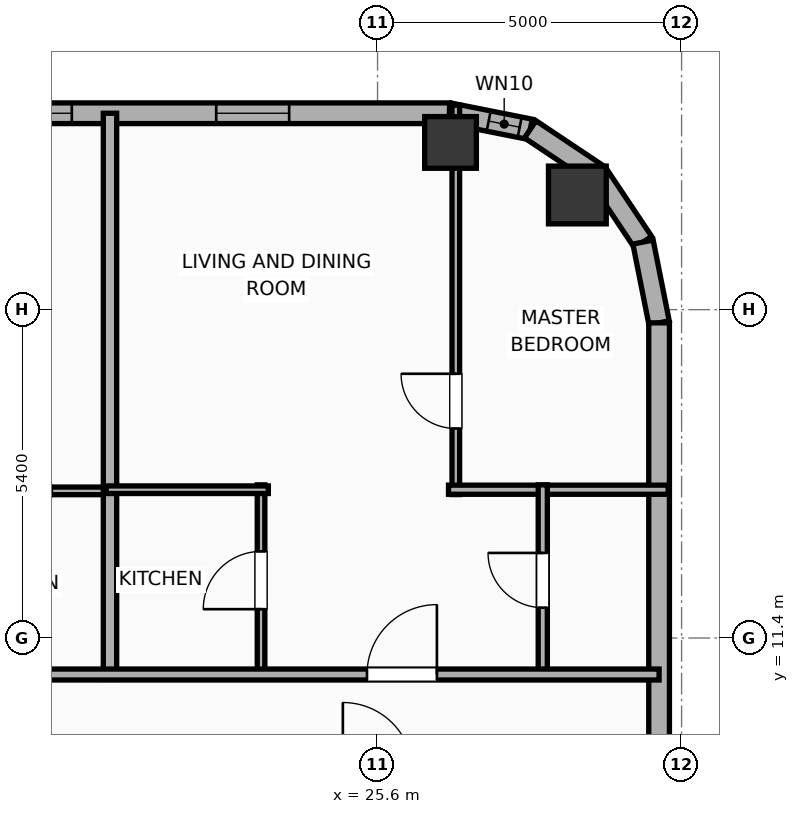
"""IFC4 building model, lengths in metres.
Left out: names, types, materials, properties, quantities, classifications, styles, units other than length and angle.
Written with IfcOpenShell. Run it as: python <this file> out.ifc"""

import sys

from ifc_helpers import new_model, si_unit, direction, frame, frame_2d, origin, origin_2d, place, context, subcontext, project, spatial, rectangle, hollow_rectangle, hollow_circle, extrude, element, fill, save


model = new_model("IFC4")
c1 = context("Model", 3, precision=1e-05, world=origin(), true_north=direction((0.0, 1.0)))
c2 = subcontext(c1, "Body", "Model", "MODEL_VIEW")
j1 = project(units=[si_unit("LENGTHUNIT", "METRE"), si_unit("PLANEANGLEUNIT", "RADIAN")], contexts=[c1])
p1 = place(None, origin())
s1 = spatial("IfcSite", under=j1, at=p1, CompositionType="ELEMENT")
p2 = place(p1, origin())
s2 = spatial("IfcBuilding", under=s1, at=p2, CompositionType="ELEMENT")
p3 = place(p2, frame((0.0, 0.0, 223.6)))
s3 = spatial("IfcBuildingStorey", under=s2, at=p3, CompositionType="ELEMENT", Elevation=223.6)
p4 = place(p3, frame((28.886, 18.686, 0.0), z_axis=(0.0, 0.0, 1.0), x_axis=(1.0, 0.0, 0.0)))
e1 = element("IfcColumn", 1, at=p4, inside=s3, PredefinedType="COLUMN", context=c2, shape_type="SweptSolid", body=[
    extrude(hollow_circle(Radius=0.475, WallThickness=0.032, at=origin_2d()), origin(), (0.0, 0.0, 1.0), 3.9),
])
p5 = place(p3, frame((26.8, 19.55, 0.0), z_axis=(0.0, 0.0, 1.0), x_axis=(1.0, 0.0, 0.0)))
e2 = element("IfcColumn", 2, at=p5, inside=s3, PredefinedType="COLUMN", context=c2, shape_type="SweptSolid", body=[
    extrude(hollow_rectangle(XDim=0.85, YDim=0.85, WallThickness=0.028, at=origin_2d()), origin(), (0.0, 0.0, 1.0), 3.9),
])
p6 = place(p3, frame((-22.783, 20.03, 0.0), z_axis=(0.0, 0.0, 1.0), x_axis=(1.0, 0.0, 0.0)))
e3 = element("IfcWall", 3, at=p6, inside=s3, PredefinedType="ELEMENTEDWALL", context=c2, shape_type="SweptSolid", body=[
    extrude(rectangle(XDim=49.566, YDim=0.34, at=frame_2d((24.783, 0.0))), origin(), (0.0, 0.0, 1.0), 3.65),
])
p7 = place(p6, frame((40.956, 0.0, 0.75)))
e4 = element("IfcOpeningElement", 4, at=p7, cuts=e3, PredefinedType="OPENING", context=c2, shape_type="SweptSolid", body=[
    extrude(rectangle(XDim=2.4, YDim=2.1, at=frame_2d((1.2, 1.05))), frame((0.0, 0.18, 0.0), z_axis=(0.0, -1.0, 0.0), x_axis=(1.0, 0.0, 0.0)), (0.0, 0.0, 1.0), 0.36),
])
p8 = place(p6, frame((1.437, 0.0, 0.75)))
e5 = element("IfcOpeningElement", 5, at=p8, cuts=e3, PredefinedType="OPENING", context=c2, shape_type="SweptSolid", body=[
    extrude(rectangle(XDim=1.2, YDim=2.05, at=frame_2d((0.6, 1.025))), frame((0.0, 0.18, 0.0), z_axis=(0.0, -1.0, 0.0), x_axis=(1.0, 0.0, 0.0)), (0.0, 0.0, 1.0), 0.36),
])
p9 = place(p6, frame((7.619, 0.0, 0.75)))
e6 = element("IfcOpeningElement", 6, at=p9, cuts=e3, PredefinedType="OPENING", context=c2, shape_type="SweptSolid", body=[
    extrude(rectangle(XDim=1.2, YDim=2.05, at=frame_2d((0.6, 1.025))), frame((0.0, 0.18, 0.0), z_axis=(0.0, -1.0, 0.0), x_axis=(1.0, 0.0, 0.0)), (0.0, 0.0, 1.0), 0.36),
])
p10 = place(p6, frame((4.124, 0.0, 0.75)))
e7 = element("IfcOpeningElement", 7, at=p10, cuts=e3, PredefinedType="OPENING", context=c2, shape_type="SweptSolid", body=[
    extrude(rectangle(XDim=1.2, YDim=2.05, at=frame_2d((0.6, 1.025))), frame((0.0, 0.18, 0.0), z_axis=(0.0, -1.0, 0.0), x_axis=(1.0, 0.0, 0.0)), (0.0, 0.0, 1.0), 0.36),
])
p11 = place(p6, frame((11.278, 0.0, 0.75)))
e8 = element("IfcOpeningElement", 8, at=p11, cuts=e3, PredefinedType="OPENING", context=c2, shape_type="SweptSolid", body=[
    extrude(rectangle(XDim=1.2, YDim=2.05, at=frame_2d((0.6, 1.025))), frame((0.0, 0.18, 0.0), z_axis=(0.0, -1.0, 0.0), x_axis=(1.0, 0.0, 0.0)), (0.0, 0.0, 1.0), 0.36),
])
p12 = place(p6, frame((17.953, 0.0, 0.75)))
e9 = element("IfcOpeningElement", 9, at=p12, cuts=e3, PredefinedType="OPENING", context=c2, shape_type="SweptSolid", body=[
    extrude(rectangle(XDim=1.2, YDim=2.05, at=frame_2d((0.6, 1.025))), frame((0.0, 0.18, 0.0), z_axis=(0.0, -1.0, 0.0), x_axis=(1.0, 0.0, 0.0)), (0.0, 0.0, 1.0), 0.36),
])
p13 = place(p6, frame((14.738, 0.0, 0.75)))
e10 = element("IfcOpeningElement", 10, at=p13, cuts=e3, PredefinedType="OPENING", context=c2, shape_type="SweptSolid", body=[
    extrude(rectangle(XDim=1.2, YDim=2.05, at=frame_2d((0.6, 1.025))), frame((0.0, 0.18, 0.0), z_axis=(0.0, -1.0, 0.0), x_axis=(1.0, 0.0, 0.0)), (0.0, 0.0, 1.0), 0.36),
])
p14 = place(p6, frame((21.878, 0.0, 0.75)))
e11 = element("IfcOpeningElement", 11, at=p14, cuts=e3, PredefinedType="OPENING", context=c2, shape_type="SweptSolid", body=[
    extrude(rectangle(XDim=1.2, YDim=2.05, at=frame_2d((0.6, 1.025))), frame((0.0, 0.18, 0.0), z_axis=(0.0, -1.0, 0.0), x_axis=(1.0, 0.0, 0.0)), (0.0, 0.0, 1.0), 0.36),
])
p15 = place(p6, frame((27.878, 0.0, 0.75)))
e12 = element("IfcOpeningElement", 12, at=p15, cuts=e3, PredefinedType="OPENING", context=c2, shape_type="SweptSolid", body=[
    extrude(rectangle(XDim=1.2, YDim=2.05, at=frame_2d((0.6, 1.025))), frame((0.0, 0.18, 0.0), z_axis=(0.0, -1.0, 0.0), x_axis=(1.0, 0.0, 0.0)), (0.0, 0.0, 1.0), 0.36),
])
p16 = place(p6, frame((24.863, 0.0, 0.75)))
e13 = element("IfcOpeningElement", 13, at=p16, cuts=e3, PredefinedType="OPENING", context=c2, shape_type="SweptSolid", body=[
    extrude(rectangle(XDim=1.2, YDim=2.05, at=frame_2d((0.6, 1.025))), frame((0.0, 0.18, 0.0), z_axis=(0.0, -1.0, 0.0), x_axis=(1.0, 0.0, 0.0)), (0.0, 0.0, 1.0), 0.36),
])
p17 = place(p6, frame((32.078, 0.0, 0.75)))
e14 = element("IfcOpeningElement", 14, at=p17, cuts=e3, PredefinedType="OPENING", context=c2, shape_type="SweptSolid", body=[
    extrude(rectangle(XDim=1.2, YDim=2.05, at=frame_2d((0.6, 1.025))), frame((0.0, 0.18, 0.0), z_axis=(0.0, -1.0, 0.0), x_axis=(1.0, 0.0, 0.0)), (0.0, 0.0, 1.0), 0.36),
])
p18 = place(p6, frame((35.216, 0.0, 0.75)))
e15 = element("IfcOpeningElement", 15, at=p18, cuts=e3, PredefinedType="OPENING", context=c2, shape_type="SweptSolid", body=[
    extrude(rectangle(XDim=1.2, YDim=2.05, at=frame_2d((0.6, 1.025))), frame((0.0, 0.18, 0.0), z_axis=(0.0, -1.0, 0.0), x_axis=(1.0, 0.0, 0.0)), (0.0, 0.0, 1.0), 0.36),
])
p19 = place(p6, frame((45.73, 0.0, 0.75)))
e16 = element("IfcOpeningElement", 16, at=p19, cuts=e3, PredefinedType="OPENING", context=c2, shape_type="SweptSolid", body=[
    extrude(rectangle(XDim=1.2, YDim=2.05, at=frame_2d((0.6, 1.025))), frame((0.0, 0.18, 0.0), z_axis=(0.0, -1.0, 0.0), x_axis=(1.0, 0.0, 0.0)), (0.0, 0.0, 1.0), 0.36),
])
p20 = place(p3, frame((26.783, 20.03, 0.0), z_axis=(0.0, 0.0, 1.0), x_axis=(0.980788153188, -0.195075878998, 0.0)))
e17 = element("IfcWall", 17, at=p20, inside=s3, PredefinedType="ELEMENTEDWALL", context=c2, shape_type="SweptSolid", body=[
    extrude(rectangle(XDim=1.354, YDim=0.34, at=frame_2d((0.677, 0.0))), origin(), (0.0, 0.0, 1.0), 3.65),
])
p21 = place(p20, frame((0.657, 0.0, 0.75)))
e18 = element("IfcOpeningElement", 18, at=p21, cuts=e17, PredefinedType="OPENING", context=c2, shape_type="SweptSolid", body=[
    extrude(rectangle(XDim=0.52, YDim=2.05, at=frame_2d((0.26, 1.025))), frame((0.0, 0.18, 0.0), z_axis=(0.0, -1.0, 0.0), x_axis=(1.0, 0.0, 0.0)), (0.0, 0.0, 1.0), 0.36),
])
for number, where, z_axis, x_axis in (
    (19, (28.111, 19.766, 0.0), (0.0, 0.0, 1.0), (0.831, -0.556, 0.0)),
    (20, (29.223, 19.023, 0.0), (0.0, 0.0, 1.0), (0.556, -0.831, 0.0)),
):
    element("IfcWall", number, at=place(p3, frame(where, z_axis=z_axis, x_axis=x_axis)), inside=s3, PredefinedType="ELEMENTEDWALL", context=c2, shape_type="SweptSolid", body=[
        extrude(rectangle(XDim=1.337, YDim=0.34, at=frame_2d((0.668, 0.0))), origin(), (0.0, 0.0, 1.0), 3.65),
    ])
p22 = place(p3, frame((29.966, 17.911, 0.0), z_axis=(0.0, 0.0, 1.0), x_axis=(0.195075878998, -0.980788153188, 0.0)))
e21 = element("IfcWall", 21, at=p22, inside=s3, PredefinedType="ELEMENTEDWALL", context=c2, shape_type="SweptSolid", body=[
    extrude(rectangle(XDim=1.354, YDim=0.34, at=frame_2d((0.677, 0.0))), origin(), (0.0, 0.0, 1.0), 3.65),
])
p23 = place(p3, frame((30.23, 16.583, 0.0), z_axis=(0.0, 0.0, 1.0), x_axis=(0.0, -1.0, 0.0)))
e22 = element("IfcWall", 22, at=p23, inside=s3, PredefinedType="ELEMENTEDWALL", context=c2, shape_type="SweptSolid", body=[
    extrude(rectangle(XDim=31.967, YDim=0.34, at=frame_2d((15.983, 0.0))), origin(), (0.0, 0.0, 1.0), 3.65),
])
p24 = place(p23, frame((30.132, 0.0, 0.75)))
e23 = element("IfcOpeningElement", 23, at=p24, cuts=e22, PredefinedType="OPENING", context=c2, shape_type="SweptSolid", body=[
    extrude(rectangle(XDim=1.2, YDim=2.05, at=frame_2d((0.6, 1.025))), frame((0.0, 0.18, 0.0), z_axis=(0.0, -1.0, 0.0), x_axis=(1.0, 0.0, 0.0)), (0.0, 0.0, 1.0), 0.36),
])
p25 = place(p23, frame((11.288, 0.0, 0.75)))
e24 = element("IfcOpeningElement", 24, at=p25, cuts=e22, PredefinedType="OPENING", context=c2, shape_type="SweptSolid", body=[
    extrude(rectangle(XDim=1.2, YDim=2.05, at=frame_2d((0.6, 1.025))), frame((0.0, 0.18, 0.0), z_axis=(0.0, -1.0, 0.0), x_axis=(1.0, 0.0, 0.0)), (0.0, 0.0, 1.0), 0.36),
])
p26 = place(p23, frame((20.538, 0.0, 0.75)))
e25 = element("IfcOpeningElement", 25, at=p26, cuts=e22, PredefinedType="OPENING", context=c2, shape_type="SweptSolid", body=[
    extrude(rectangle(XDim=1.2, YDim=2.05, at=frame_2d((0.6, 1.025))), frame((0.0, 0.18, 0.0), z_axis=(0.0, -1.0, 0.0), x_axis=(1.0, 0.0, 0.0)), (0.0, 0.0, 1.0), 0.36),
])
p27 = place(p3, frame((18.077, 13.82, 0.0), z_axis=(0.0, 0.0, 1.0), x_axis=(1.0, 0.0, 0.0)))
e26 = element("IfcWall", 26, at=p27, inside=s3, PredefinedType="PARTITIONING", context=c2, shape_type="SweptSolid", body=[
    extrude(rectangle(XDim=3.186, YDim=0.125, at=frame_2d((1.593, 0.0))), origin(), (0.0, 0.0, 1.0), 3.65),
])
p28 = place(p27, frame((1.217, 0.0, 0.0)))
e27 = element("IfcOpeningElement", 27, at=p28, cuts=e26, PredefinedType="OPENING", context=c2, shape_type="SweptSolid", body=[
    extrude(rectangle(XDim=0.95, YDim=2.05, at=frame_2d((0.475, 1.025))), frame((0.0, 0.073, 0.0), z_axis=(0.0, -1.0, 0.0), x_axis=(1.0, 0.0, 0.0)), (0.0, 0.0, 1.0), 0.145),
])
p29 = place(p3, frame((21.2, 10.72, 0.0), z_axis=(0.0, 0.0, 1.0), x_axis=(0.0, 1.0, 0.0)))
e28 = element("IfcWall", 28, at=p29, inside=s3, PredefinedType="PARTITIONING", context=c2, shape_type="SweptSolid", body=[
    extrude(rectangle(XDim=9.31, YDim=0.22, at=frame_2d((4.655, 0.0))), origin(), (0.0, 0.0, 1.0), 3.65),
])
p30 = place(p3, frame((26.887, 13.759, 0.0), z_axis=(0.0, 0.0, 1.0), x_axis=(0.0, 1.0, 0.0)))
e29 = element("IfcWall", 29, at=p30, inside=s3, PredefinedType="PARTITIONING", context=c2, shape_type="SweptSolid", body=[
    extrude(rectangle(XDim=6.403, YDim=0.125, at=frame_2d((3.202, 0.0))), origin(), (0.0, 0.0, 1.0), 3.65),
])
p31 = place(p30, frame((1.087, 0.0, 0.0)))
e30 = element("IfcOpeningElement", 30, at=p31, cuts=e29, PredefinedType="OPENING", context=c2, shape_type="SweptSolid", body=[
    extrude(rectangle(XDim=0.9, YDim=2.05, at=frame_2d((0.45, 1.025))), frame((0.0, 0.073, 0.0), z_axis=(0.0, -1.0, 0.0), x_axis=(1.0, 0.0, 0.0)), (0.0, 0.0, 1.0), 0.145),
])
p32 = place(p3, frame((26.767, 13.839, 0.0), z_axis=(0.0, 0.0, 1.0), x_axis=(1.0, 0.0, 0.0)))
e31 = element("IfcWall", 31, at=p32, inside=s3, PredefinedType="PLUMBINGWALL", context=c2, shape_type="SweptSolid", body=[
    extrude(rectangle(XDim=3.613, YDim=0.15, at=frame_2d((1.806, 0.0))), origin(), (0.0, 0.0, 1.0), 3.65),
])
p33 = place(p3, frame((23.684, 10.78, 0.0), z_axis=(0.0, 0.0, 1.0), x_axis=(0.0, 1.0, 0.0)))
e32 = element("IfcWall", 32, at=p33, inside=s3, PredefinedType="PARTITIONING", context=c2, shape_type="SweptSolid", body=[
    extrude(rectangle(XDim=3.139, YDim=0.125, at=frame_2d((1.569, 0.0))), origin(), (0.0, 0.0, 1.0), 3.65),
])
p34 = place(p33, frame((1.094, 0.0, 0.0)))
e33 = element("IfcOpeningElement", 33, at=p34, cuts=e32, PredefinedType="OPENING", context=c2, shape_type="SweptSolid", body=[
    extrude(rectangle(XDim=0.95, YDim=2.05, at=frame_2d((0.475, 1.025))), frame((0.0, 0.073, 0.0), z_axis=(0.0, -1.0, 0.0), x_axis=(1.0, 0.0, 0.0)), (0.0, 0.0, 1.0), 0.145),
])
p35 = place(p3, frame((21.137, 13.839, 0.0), z_axis=(0.0, 0.0, 1.0), x_axis=(1.0, 0.0, 0.0)))
e34 = element("IfcWall", 34, at=p35, inside=s3, PredefinedType="PARTITIONING", context=c2, shape_type="SweptSolid", body=[
    extrude(rectangle(XDim=2.667, YDim=0.125, at=frame_2d((1.333, 0.0))), origin(), (0.0, 0.0, 1.0), 3.65),
])
p36 = place(p3, frame((28.317, 10.78, 0.0), z_axis=(0.0, 0.0, 1.0), x_axis=(0.0, 1.0, 0.0)))
e35 = element("IfcWall", 35, at=p36, inside=s3, PredefinedType="PLUMBINGWALL", context=c2, shape_type="SweptSolid", body=[
    extrude(rectangle(XDim=3.139, YDim=0.15, at=frame_2d((1.569, 0.0))), origin(), (0.0, 0.0, 1.0), 3.65),
])
p37 = place(p36, frame((1.119, 0.0, 0.0)))
e36 = element("IfcOpeningElement", 36, at=p37, cuts=e35, PredefinedType="OPENING", context=c2, shape_type="SweptSolid", body=[
    extrude(rectangle(XDim=0.9, YDim=2.05, at=frame_2d((0.45, 1.025))), frame((0.0, 0.085, 0.0), z_axis=(0.0, -1.0, 0.0), x_axis=(1.0, 0.0, 0.0)), (0.0, 0.0, 1.0), 0.17),
])
p38 = place(p3, frame((-26.23, 10.8, 0.0), z_axis=(0.0, 0.0, 1.0), x_axis=(1.0, 0.0, 0.0)))
e37 = element("IfcWall", 37, at=p38, inside=s3, PredefinedType="PARTITIONING", context=c2, shape_type="SweptSolid", body=[
    extrude(rectangle(XDim=56.46, YDim=0.18, at=frame_2d((28.23, 0.0))), origin(), (0.0, 0.0, 1.0), 3.65),
])
p39 = place(p38, frame((2.994, 0.0, 0.0)))
e38 = element("IfcOpeningElement", 38, at=p39, cuts=e37, PredefinedType="OPENING", context=c2, shape_type="SweptSolid", body=[
    extrude(rectangle(XDim=0.9, YDim=2.05, at=frame_2d((0.45, 1.025))), frame((0.0, 0.1, 0.0), z_axis=(0.0, -1.0, 0.0), x_axis=(1.0, 0.0, 0.0)), (0.0, 0.0, 1.0), 0.2),
])
p40 = place(p38, frame((11.745, 0.0, 0.0)))
e39 = element("IfcOpeningElement", 39, at=p40, cuts=e37, PredefinedType="OPENING", context=c2, shape_type="SweptSolid", body=[
    extrude(rectangle(XDim=1.15, YDim=2.05, at=frame_2d((0.575, 1.025))), frame((0.0, 0.1, 0.0), z_axis=(0.0, -1.0, 0.0), x_axis=(1.0, 0.0, 0.0)), (0.0, 0.0, 1.0), 0.2),
])
p41 = place(p38, frame((21.907, 0.0, 0.0)))
e40 = element("IfcOpeningElement", 40, at=p41, cuts=e37, PredefinedType="OPENING", context=c2, shape_type="SweptSolid", body=[
    extrude(rectangle(XDim=1.15, YDim=2.05, at=frame_2d((0.575, 1.025))), frame((0.0, 0.1, 0.0), z_axis=(0.0, -1.0, 0.0), x_axis=(1.0, 0.0, 0.0)), (0.0, 0.0, 1.0), 0.2),
])
p42 = place(p38, frame((32.516, 0.0, 0.0)))
e41 = element("IfcOpeningElement", 41, at=p42, cuts=e37, PredefinedType="OPENING", context=c2, shape_type="SweptSolid", body=[
    extrude(rectangle(XDim=1.15, YDim=2.05, at=frame_2d((0.575, 1.025))), frame((0.0, 0.1, 0.0), z_axis=(0.0, -1.0, 0.0), x_axis=(1.0, 0.0, 0.0)), (0.0, 0.0, 1.0), 0.2),
])
p43 = place(p38, frame((41.956, 0.0, 0.0)))
e42 = element("IfcOpeningElement", 42, at=p43, cuts=e37, PredefinedType="OPENING", context=c2, shape_type="SweptSolid", body=[
    extrude(rectangle(XDim=1.15, YDim=2.05, at=frame_2d((0.575, 1.025))), frame((0.0, 0.1, 0.0), z_axis=(0.0, -1.0, 0.0), x_axis=(1.0, 0.0, 0.0)), (0.0, 0.0, 1.0), 0.2),
])
p44 = place(p38, frame((51.656, 0.0, 0.0)))
e43 = element("IfcOpeningElement", 43, at=p44, cuts=e37, PredefinedType="OPENING", context=c2, shape_type="SweptSolid", body=[
    extrude(rectangle(XDim=1.15, YDim=2.05, at=frame_2d((0.575, 1.025))), frame((0.0, 0.1, 0.0), z_axis=(0.0, -1.0, 0.0), x_axis=(1.0, 0.0, 0.0)), (0.0, 0.0, 1.0), 0.2),
])
p45 = place(p7, origin())
e44 = element("IfcWindow", 44, at=p45, inside=s3, PartitioningType="SINGLE_PANEL", PredefinedType="WINDOW", context=c2, shape_type="SweptSolid", body=[
    extrude(rectangle(XDim=2.4, YDim=2.1, at=frame_2d((1.2, 1.05))), frame((0.0, 0.03, 0.0), z_axis=(0.0, -1.0, 0.0), x_axis=(1.0, 0.0, 0.0)), (0.0, 0.0, 1.0), 0.06),
])
fill(e4, e44)
p46 = place(p19, origin())
e45 = element("IfcWindow", 45, at=p46, inside=s3, PartitioningType="SINGLE_PANEL", PredefinedType="WINDOW", context=c2, shape_type="SweptSolid", body=[
    extrude(rectangle(XDim=1.2, YDim=2.05, at=frame_2d((0.6, 1.025))), frame((0.0, 0.03, 0.0), z_axis=(0.0, -1.0, 0.0), x_axis=(1.0, 0.0, 0.0)), (0.0, 0.0, 1.0), 0.06),
])
fill(e16, e45)
p47 = place(p21, origin())
e46 = element("IfcWindow", 46, at=p47, inside=s3, PartitioningType="SINGLE_PANEL", PredefinedType="WINDOW", context=c2, shape_type="SweptSolid", body=[
    extrude(rectangle(XDim=0.52, YDim=2.05, at=frame_2d((0.26, 1.025))), frame((0.0, 0.03, 0.0), z_axis=(0.0, -1.0, 0.0), x_axis=(1.0, 0.0, 0.0)), (0.0, 0.0, 1.0), 0.06),
])
fill(e18, e46)
p48 = place(p31, origin())
e47 = element("IfcDoor", 47, at=p48, inside=s3, OperationType="SINGLE_SWING_RIGHT", PredefinedType="DOOR", context=c2, shape_type="SweptSolid", body=[
    extrude(rectangle(XDim=0.9, YDim=2.05, at=frame_2d((0.45, 1.025))), frame((0.0, 0.025, 0.0), z_axis=(0.0, -1.0, 0.0), x_axis=(1.0, 0.0, 0.0)), (0.0, 0.0, 1.0), 0.05),
])
fill(e30, e47)
p49 = place(p34, origin())
e48 = element("IfcDoor", 48, at=p49, inside=s3, OperationType="SINGLE_SWING_LEFT", PredefinedType="DOOR", context=c2, shape_type="SweptSolid", body=[
    extrude(rectangle(XDim=0.95, YDim=2.05, at=frame_2d((0.475, 1.025))), frame((0.0, 0.025, 0.0), z_axis=(0.0, -1.0, 0.0), x_axis=(1.0, 0.0, 0.0)), (0.0, 0.0, 1.0), 0.05),
])
fill(e33, e48)
p50 = place(p37, origin())
e49 = element("IfcDoor", 49, at=p50, inside=s3, OperationType="SINGLE_SWING_RIGHT", PredefinedType="DOOR", context=c2, shape_type="SweptSolid", body=[
    extrude(rectangle(XDim=0.9, YDim=2.05, at=frame_2d((0.45, 1.025))), frame((0.0, 0.025, 0.0), z_axis=(0.0, -1.0, 0.0), x_axis=(1.0, 0.0, 0.0)), (0.0, 0.0, 1.0), 0.05),
])
fill(e36, e49)
p51 = place(p44, origin())
e50 = element("IfcDoor", 50, at=p51, inside=s3, OperationType="SINGLE_SWING_RIGHT", PredefinedType="DOOR", context=c2, shape_type="SweptSolid", body=[
    extrude(rectangle(XDim=1.15, YDim=2.05, at=frame_2d((0.575, 1.025))), frame((0.0, 0.025, 0.0), z_axis=(0.0, -1.0, 0.0), x_axis=(1.0, 0.0, 0.0)), (0.0, 0.0, 1.0), 0.05),
])
fill(e43, e50)
save(model, sys.argv[1])
